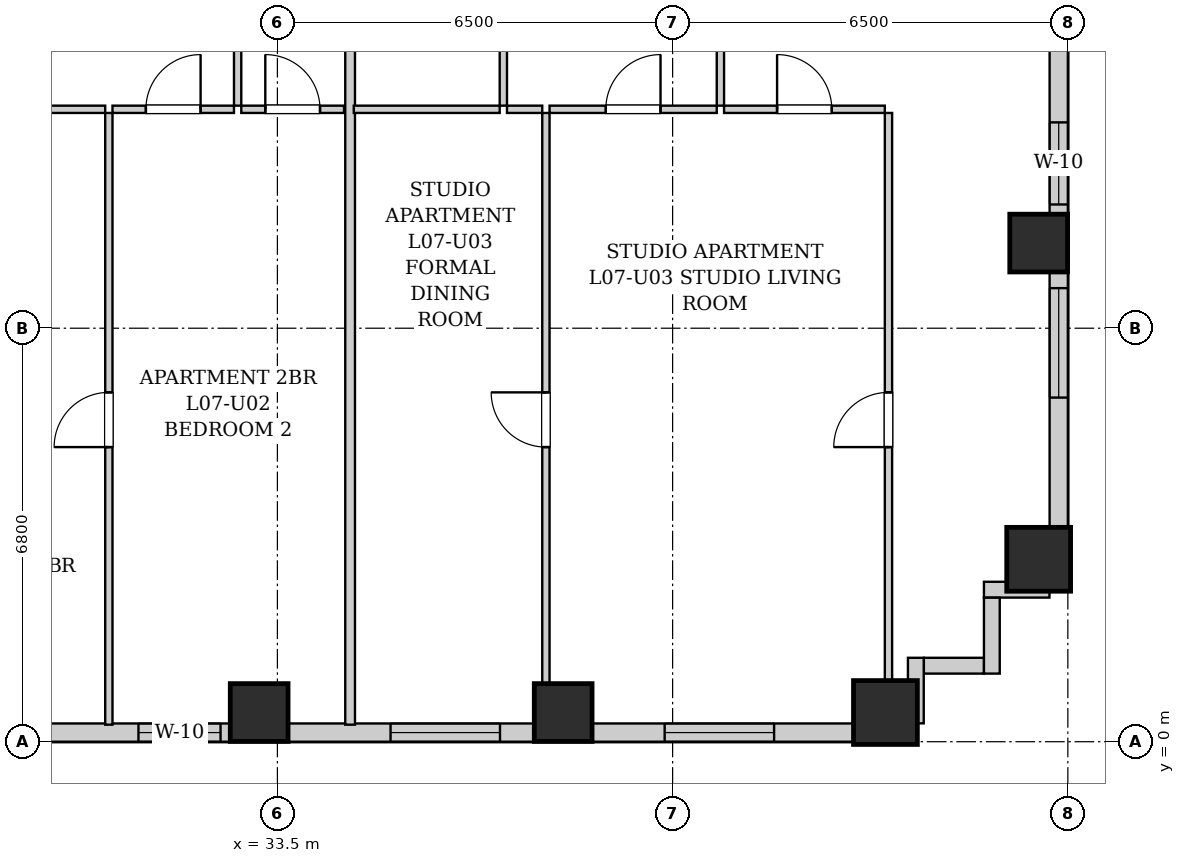
"""IFC4 building model, lengths in metres.
Left out: names, types, materials, properties, quantities, classifications, styles, units other than length and angle.
Written with IfcOpenShell. Run it as: python <this file> out.ifc"""

import sys

from ifc_helpers import new_model, si_unit, direction, frame, frame_2d, origin, origin_2d, place, context, subcontext, project, spatial, rectangle, extrude, element, fill, save


model = new_model("IFC4")
c1 = context("Model", 3, precision=1e-05, world=origin(), true_north=direction((0.0, 1.0)))
c2 = subcontext(c1, "Body", "Model", "MODEL_VIEW")
j1 = project(units=[si_unit("LENGTHUNIT", "METRE"), si_unit("PLANEANGLEUNIT", "RADIAN")], contexts=[c1])
p1 = place(None, origin())
s1 = spatial("IfcSite", under=j1, at=p1, CompositionType="ELEMENT")
p2 = place(p1, origin())
s2 = spatial("IfcBuilding", under=s1, at=p2, CompositionType="ELEMENT")
p3 = place(p2, frame((0.0, 0.0, 32.2)))
s3 = spatial("IfcBuildingStorey", under=s2, at=p3, CompositionType="ELEMENT", Elevation=32.2)
for number, where, z_axis, x_axis in (
    (1, (33.2, 0.48, 0.0), (0.0, 0.0, 1.0), (1.0, 0.0, 0.0)),
    (2, (38.2, 0.48, 0.0), (0.0, 0.0, 1.0), (1.0, 0.0, 0.0)),
):
    element("IfcColumn", number, at=place(p3, frame(where, z_axis=z_axis, x_axis=x_axis)), inside=s3, PredefinedType="COLUMN", context=c2, shape_type="SweptSolid", body=[
        extrude(rectangle(XDim=0.95, YDim=0.95, at=origin_2d()), origin(), (0.0, 0.0, 1.0), 3.2),
    ])
for number, where, z_axis, x_axis in (
    (3, (43.5, 0.48, 0.0), (0.0, 0.0, 1.0), (1.0, 0.0, 0.0)),
    (4, (46.02, 3.0, 0.0), (0.0, 0.0, 1.0), (1.0, 0.0, 0.0)),
):
    element("IfcColumn", number, at=place(p3, frame(where, z_axis=z_axis, x_axis=x_axis)), inside=s3, PredefinedType="COLUMN", context=c2, shape_type="SweptSolid", body=[
        extrude(rectangle(XDim=1.05, YDim=1.05, at=origin_2d()), origin(), (0.0, 0.0, 1.0), 3.2),
    ])
p4 = place(p3, frame((46.02, 8.2, 0.0), z_axis=(0.0, 0.0, 1.0), x_axis=(1.0, 0.0, 0.0)))
e5 = element("IfcColumn", 5, at=p4, inside=s3, PredefinedType="COLUMN", context=c2, shape_type="SweptSolid", body=[
    extrude(rectangle(XDim=0.95, YDim=0.95, at=origin_2d()), origin(), (0.0, 0.0, 1.0), 3.2),
])
p5 = place(p3, frame((46.35, 24.6, 0.0), z_axis=(0.0, 0.0, 1.0), x_axis=(0.0, -1.0, 0.0)))
e6 = element("IfcWall", 6, at=p5, inside=s3, PredefinedType="SOLIDWALL", context=c2, shape_type="SweptSolid", body=[
    extrude(rectangle(XDim=22.1, YDim=0.3, at=frame_2d((11.05, 0.0))), origin(), (0.0, 0.0, 1.0), 1.975),
])
p6 = place(p5, frame((17.141, 0.0, 0.55)))
e7 = element("IfcOpeningElement", 7, at=p6, cuts=e6, PredefinedType="OPENING", context=c2, shape_type="SweptSolid", body=[
    extrude(rectangle(XDim=1.8, YDim=1.2, at=frame_2d((0.9, 0.6))), frame((0.0, 0.16, 0.0), z_axis=(0.0, -1.0, 0.0), x_axis=(1.0, 0.0, 0.0)), (0.0, 0.0, 1.0), 0.32),
])
p7 = place(p5, frame((14.415, 0.0, 0.55)))
e8 = element("IfcOpeningElement", 8, at=p7, cuts=e6, PredefinedType="OPENING", context=c2, shape_type="SweptSolid", body=[
    extrude(rectangle(XDim=1.35, YDim=1.2, at=frame_2d((0.675, 0.6))), frame((0.0, 0.16, 0.0), z_axis=(0.0, -1.0, 0.0), x_axis=(1.0, 0.0, 0.0)), (0.0, 0.0, 1.0), 0.32),
])
p8 = place(p5, frame((5.1, 0.0, 0.55)))
e9 = element("IfcOpeningElement", 9, at=p8, cuts=e6, PredefinedType="OPENING", context=c2, shape_type="SweptSolid", body=[
    extrude(rectangle(XDim=1.8, YDim=1.2, at=frame_2d((0.9, 0.6))), frame((0.0, 0.16, 0.0), z_axis=(0.0, -1.0, 0.0), x_axis=(1.0, 0.0, 0.0)), (0.0, 0.0, 1.0), 0.32),
])
p9 = place(p5, frame((7.16, 0.0, 0.55)))
e10 = element("IfcOpeningElement", 10, at=p9, cuts=e6, PredefinedType="OPENING", context=c2, shape_type="SweptSolid", body=[
    extrude(rectangle(XDim=1.35, YDim=1.2, at=frame_2d((0.675, 0.6))), frame((0.0, 0.16, 0.0), z_axis=(0.0, -1.0, 0.0), x_axis=(1.0, 0.0, 0.0)), (0.0, 0.0, 1.0), 0.32),
])
p10 = place(p3, frame((44.0, 0.15, 0.0), z_axis=(0.0, 0.0, 1.0), x_axis=(-1.0, 0.0, 0.0)))
e11 = element("IfcWall", 11, at=p10, inside=s3, PredefinedType="SOLIDWALL", context=c2, shape_type="SweptSolid", body=[
    extrude(rectangle(XDim=26.9, YDim=0.3, at=frame_2d((13.45, 0.0))), origin(), (0.0, 0.0, 1.0), 1.975),
])
p11 = place(p10, frame((22.544, 0.0, 0.55)))
e12 = element("IfcOpeningElement", 12, at=p11, cuts=e11, PredefinedType="OPENING", context=c2, shape_type="SweptSolid", body=[
    extrude(rectangle(XDim=1.8, YDim=1.2, at=frame_2d((0.9, 0.6))), frame((0.0, 0.16, 0.0), z_axis=(0.0, -1.0, 0.0), x_axis=(1.0, 0.0, 0.0)), (0.0, 0.0, 1.0), 0.32),
])
p12 = place(p10, frame((14.353, 0.0, 0.55)))
e13 = element("IfcOpeningElement", 13, at=p12, cuts=e11, PredefinedType="OPENING", context=c2, shape_type="SweptSolid", body=[
    extrude(rectangle(XDim=1.8, YDim=1.2, at=frame_2d((0.9, 0.6))), frame((0.0, 0.16, 0.0), z_axis=(0.0, -1.0, 0.0), x_axis=(1.0, 0.0, 0.0)), (0.0, 0.0, 1.0), 0.32),
])
p13 = place(p10, frame((11.435, 0.0, 0.55)))
e14 = element("IfcOpeningElement", 14, at=p13, cuts=e11, PredefinedType="OPENING", context=c2, shape_type="SweptSolid", body=[
    extrude(rectangle(XDim=1.35, YDim=1.2, at=frame_2d((0.675, 0.6))), frame((0.0, 0.16, 0.0), z_axis=(0.0, -1.0, 0.0), x_axis=(1.0, 0.0, 0.0)), (0.0, 0.0, 1.0), 0.32),
])
p14 = place(p10, frame((6.839, 0.0, 0.55)))
e15 = element("IfcOpeningElement", 15, at=p14, cuts=e11, PredefinedType="OPENING", context=c2, shape_type="SweptSolid", body=[
    extrude(rectangle(XDim=1.8, YDim=1.2, at=frame_2d((0.9, 0.6))), frame((0.0, 0.16, 0.0), z_axis=(0.0, -1.0, 0.0), x_axis=(1.0, 0.0, 0.0)), (0.0, 0.0, 1.0), 0.32),
])
p15 = place(p10, frame((2.331, 0.0, 0.55)))
e16 = element("IfcOpeningElement", 16, at=p15, cuts=e11, PredefinedType="OPENING", context=c2, shape_type="SweptSolid", body=[
    extrude(rectangle(XDim=1.8, YDim=1.2, at=frame_2d((0.9, 0.6))), frame((0.0, 0.16, 0.0), z_axis=(0.0, -1.0, 0.0), x_axis=(1.0, 0.0, 0.0)), (0.0, 0.0, 1.0), 0.32),
])
p16 = place(p3, frame((46.198, 2.5, 0.0), z_axis=(0.0, 0.0, 1.0), x_axis=(-1.0, 0.0, 0.0)))
e17 = element("IfcWall", 17, at=p16, inside=s3, PredefinedType="SOLIDWALL", context=c2, shape_type="SweptSolid", body=[
    extrude(rectangle(XDim=1.078, YDim=0.26, at=frame_2d((0.539, 0.0))), origin(), (0.0, 0.0, 1.0), 2.94),
])
p17 = place(p3, frame((45.25, 2.368, 0.0), z_axis=(0.0, 0.0, 1.0), x_axis=(0.0, -1.0, 0.0)))
e18 = element("IfcWall", 18, at=p17, inside=s3, PredefinedType="SOLIDWALL", context=c2, shape_type="SweptSolid", body=[
    extrude(rectangle(XDim=1.248, YDim=0.26, at=frame_2d((0.624, 0.0))), origin(), (0.0, 0.0, 1.0), 2.94),
])
p18 = place(p3, frame((45.118, 1.25, 0.0), z_axis=(0.0, 0.0, 1.0), x_axis=(-1.0, 0.0, 0.0)))
e19 = element("IfcWall", 19, at=p18, inside=s3, PredefinedType="SOLIDWALL", context=c2, shape_type="SweptSolid", body=[
    extrude(rectangle(XDim=0.986, YDim=0.26, at=frame_2d((0.493, 0.0))), origin(), (0.0, 0.0, 1.0), 2.94),
])
p19 = place(p3, frame((44.0, 1.38, 0.0), z_axis=(0.0, 0.0, 1.0), x_axis=(0.0, -1.0, 0.0)))
e20 = element("IfcWall", 20, at=p19, inside=s3, PredefinedType="SOLIDWALL", context=c2, shape_type="SweptSolid", body=[
    extrude(rectangle(XDim=1.078, YDim=0.26, at=frame_2d((0.539, 0.0))), origin(), (0.0, 0.0, 1.0), 2.94),
])
p20 = place(p3, frame((32.846, 10.46, 0.0), z_axis=(0.0, 0.0, 1.0), x_axis=(0.0, 1.0, 0.0)))
e21 = element("IfcWall", 21, at=p20, inside=s3, PredefinedType="PARTITIONING", context=c2, shape_type="SweptSolid", body=[
    extrude(rectangle(XDim=2.85, YDim=0.12, at=frame_2d((1.425, 0.0))), origin(), (0.0, 0.0, 1.0), 2.94),
])
p21 = place(p20, frame((0.975, 0.0, 0.0)))
e22 = element("IfcOpeningElement", 22, at=p21, cuts=e21, PredefinedType="OPENING", context=c2, shape_type="SweptSolid", body=[
    extrude(rectangle(XDim=0.9, YDim=2.05, at=frame_2d((0.45, 1.025))), frame((0.0, 0.07, 0.0), z_axis=(0.0, -1.0, 0.0), x_axis=(1.0, 0.0, 0.0)), (0.0, 0.0, 1.0), 0.14),
])
p22 = place(p3, frame((29.636, 10.4, 0.0), z_axis=(0.0, 0.0, 1.0), x_axis=(1.0, 0.0, 0.0)))
e23 = element("IfcWall", 23, at=p22, inside=s3, PredefinedType="PARTITIONING", context=c2, shape_type="SweptSolid", body=[
    extrude(rectangle(XDim=1.032, YDim=0.12, at=frame_2d((0.516, 0.0))), origin(), (0.0, 0.0, 1.0), 2.94),
])
p23 = place(p3, frame((30.788, 10.4, 0.0), z_axis=(0.0, 0.0, 1.0), x_axis=(1.0, 0.0, 0.0)))
e24 = element("IfcWall", 24, at=p23, inside=s3, PredefinedType="PARTITIONING", context=c2, shape_type="SweptSolid", body=[
    extrude(rectangle(XDim=1.998, YDim=0.12, at=frame_2d((0.999, 0.0))), origin(), (0.0, 0.0, 1.0), 2.94),
])
p24 = place(p23, frame((0.549, 0.0, 0.0)))
e25 = element("IfcOpeningElement", 25, at=p24, cuts=e24, PredefinedType="OPENING", context=c2, shape_type="SweptSolid", body=[
    extrude(rectangle(XDim=0.9, YDim=2.05, at=frame_2d((0.45, 1.025))), frame((0.0, 0.07, 0.0), z_axis=(0.0, -1.0, 0.0), x_axis=(1.0, 0.0, 0.0)), (0.0, 0.0, 1.0), 0.14),
])
p25 = place(p3, frame((32.906, 10.4, 0.0), z_axis=(0.0, 0.0, 1.0), x_axis=(1.0, 0.0, 0.0)))
e26 = element("IfcWall", 26, at=p25, inside=s3, PredefinedType="PARTITIONING", context=c2, shape_type="SweptSolid", body=[
    extrude(rectangle(XDim=1.69, YDim=0.12, at=frame_2d((0.845, 0.0))), origin(), (0.0, 0.0, 1.0), 2.94),
])
p26 = place(p25, frame((0.395, 0.0, 0.0)))
e27 = element("IfcOpeningElement", 27, at=p26, cuts=e26, PredefinedType="OPENING", context=c2, shape_type="SweptSolid", body=[
    extrude(rectangle(XDim=0.9, YDim=2.05, at=frame_2d((0.45, 1.025))), frame((0.0, 0.07, 0.0), z_axis=(0.0, -1.0, 0.0), x_axis=(1.0, 0.0, 0.0)), (0.0, 0.0, 1.0), 0.14),
])
p27 = place(p3, frame((30.728, 0.28, 0.0), z_axis=(0.0, 0.0, 1.0), x_axis=(0.0, 1.0, 0.0)))
e28 = element("IfcWall", 28, at=p27, inside=s3, PredefinedType="PARTITIONING", context=c2, shape_type="SweptSolid", body=[
    extrude(rectangle(XDim=10.06, YDim=0.12, at=frame_2d((5.03, 0.0))), origin(), (0.0, 0.0, 1.0), 2.94),
])
p28 = place(p27, frame((4.565, 0.0, 0.0)))
e29 = element("IfcOpeningElement", 29, at=p28, cuts=e28, PredefinedType="OPENING", context=c2, shape_type="SweptSolid", body=[
    extrude(rectangle(XDim=0.9, YDim=2.05, at=frame_2d((0.45, 1.025))), frame((0.0, 0.07, 0.0), z_axis=(0.0, -1.0, 0.0), x_axis=(1.0, 0.0, 0.0)), (0.0, 0.0, 1.0), 0.14),
])
p29 = place(p3, frame((34.696, 0.28, 0.0), z_axis=(0.0, 0.0, 1.0), x_axis=(0.0, 1.0, 0.0)))
e30 = element("IfcWall", 30, at=p29, inside=s3, PredefinedType="PARTITIONING", context=c2, shape_type="SweptSolid", body=[
    extrude(rectangle(XDim=13.03, YDim=0.16, at=frame_2d((6.515, 0.0))), origin(), (0.0, 0.0, 1.0), 2.94),
])
p30 = place(p3, frame((37.216, 10.46, 0.0), z_axis=(0.0, 0.0, 1.0), x_axis=(0.0, 1.0, 0.0)))
e31 = element("IfcWall", 31, at=p30, inside=s3, PredefinedType="PARTITIONING", context=c2, shape_type="SweptSolid", body=[
    extrude(rectangle(XDim=2.85, YDim=0.12, at=frame_2d((1.425, 0.0))), origin(), (0.0, 0.0, 1.0), 2.94),
])
p31 = place(p30, frame((0.995, 0.0, 0.0)))
e32 = element("IfcOpeningElement", 32, at=p31, cuts=e31, PredefinedType="OPENING", context=c2, shape_type="SweptSolid", body=[
    extrude(rectangle(XDim=0.86, YDim=2.05, at=frame_2d((0.43, 1.025))), frame((0.0, 0.07, 0.0), z_axis=(0.0, -1.0, 0.0), x_axis=(1.0, 0.0, 0.0)), (0.0, 0.0, 1.0), 0.14),
])
p32 = place(p3, frame((34.756, 10.4, 0.0), z_axis=(0.0, 0.0, 1.0), x_axis=(1.0, 0.0, 0.0)))
e33 = element("IfcWall", 33, at=p32, inside=s3, PredefinedType="PARTITIONING", context=c2, shape_type="SweptSolid", body=[
    extrude(rectangle(XDim=2.4, YDim=0.12, at=frame_2d((1.2, 0.0))), origin(), (0.0, 0.0, 1.0), 2.94),
])
p33 = place(p3, frame((40.786, 10.46, 0.0), z_axis=(0.0, 0.0, 1.0), x_axis=(0.0, 1.0, 0.0)))
e34 = element("IfcWall", 34, at=p33, inside=s3, PredefinedType="PARTITIONING", context=c2, shape_type="SweptSolid", body=[
    extrude(rectangle(XDim=2.85, YDim=0.12, at=frame_2d((1.425, 0.0))), origin(), (0.0, 0.0, 1.0), 2.94),
])
p34 = place(p33, frame((0.975, 0.0, 0.0)))
e35 = element("IfcOpeningElement", 35, at=p34, cuts=e34, PredefinedType="OPENING", context=c2, shape_type="SweptSolid", body=[
    extrude(rectangle(XDim=0.9, YDim=2.05, at=frame_2d((0.45, 1.025))), frame((0.0, 0.07, 0.0), z_axis=(0.0, -1.0, 0.0), x_axis=(1.0, 0.0, 0.0)), (0.0, 0.0, 1.0), 0.14),
])
p35 = place(p3, frame((37.276, 10.4, 0.0), z_axis=(0.0, 0.0, 1.0), x_axis=(1.0, 0.0, 0.0)))
e36 = element("IfcWall", 36, at=p35, inside=s3, PredefinedType="PARTITIONING", context=c2, shape_type="SweptSolid", body=[
    extrude(rectangle(XDim=0.58, YDim=0.12, at=frame_2d((0.29, 0.0))), origin(), (0.0, 0.0, 1.0), 2.94),
])
p36 = place(p3, frame((37.976, 10.4, 0.0), z_axis=(0.0, 0.0, 1.0), x_axis=(1.0, 0.0, 0.0)))
e37 = element("IfcWall", 37, at=p36, inside=s3, PredefinedType="PARTITIONING", context=c2, shape_type="SweptSolid", body=[
    extrude(rectangle(XDim=2.75, YDim=0.12, at=frame_2d((1.375, 0.0))), origin(), (0.0, 0.0, 1.0), 2.94),
])
p37 = place(p36, frame((0.925, 0.0, 0.0)))
e38 = element("IfcOpeningElement", 38, at=p37, cuts=e37, PredefinedType="OPENING", context=c2, shape_type="SweptSolid", body=[
    extrude(rectangle(XDim=0.9, YDim=2.05, at=frame_2d((0.45, 1.025))), frame((0.0, 0.07, 0.0), z_axis=(0.0, -1.0, 0.0), x_axis=(1.0, 0.0, 0.0)), (0.0, 0.0, 1.0), 0.14),
])
p38 = place(p3, frame((40.846, 10.4, 0.0), z_axis=(0.0, 0.0, 1.0), x_axis=(1.0, 0.0, 0.0)))
e39 = element("IfcWall", 39, at=p38, inside=s3, PredefinedType="PARTITIONING", context=c2, shape_type="SweptSolid", body=[
    extrude(rectangle(XDim=2.644, YDim=0.12, at=frame_2d((1.322, 0.0))), origin(), (0.0, 0.0, 1.0), 2.94),
])
p39 = place(p38, frame((0.872, 0.0, 0.0)))
e40 = element("IfcOpeningElement", 40, at=p39, cuts=e39, PredefinedType="OPENING", context=c2, shape_type="SweptSolid", body=[
    extrude(rectangle(XDim=0.9, YDim=2.05, at=frame_2d((0.45, 1.025))), frame((0.0, 0.07, 0.0), z_axis=(0.0, -1.0, 0.0), x_axis=(1.0, 0.0, 0.0)), (0.0, 0.0, 1.0), 0.14),
])
p40 = place(p3, frame((37.916, 0.28, 0.0), z_axis=(0.0, 0.0, 1.0), x_axis=(0.0, 1.0, 0.0)))
e41 = element("IfcWall", 41, at=p40, inside=s3, PredefinedType="PARTITIONING", context=c2, shape_type="SweptSolid", body=[
    extrude(rectangle(XDim=10.06, YDim=0.12, at=frame_2d((5.03, 0.0))), origin(), (0.0, 0.0, 1.0), 2.94),
])
p41 = place(p40, frame((4.565, 0.0, 0.0)))
e42 = element("IfcOpeningElement", 42, at=p41, cuts=e41, PredefinedType="OPENING", context=c2, shape_type="SweptSolid", body=[
    extrude(rectangle(XDim=0.9, YDim=2.05, at=frame_2d((0.45, 1.025))), frame((0.0, 0.07, 0.0), z_axis=(0.0, -1.0, 0.0), x_axis=(1.0, 0.0, 0.0)), (0.0, 0.0, 1.0), 0.14),
])
p42 = place(p3, frame((43.55, 0.28, 0.0), z_axis=(0.0, 0.0, 1.0), x_axis=(0.0, 1.0, 0.0)))
e43 = element("IfcWall", 43, at=p42, inside=s3, PredefinedType="PARTITIONING", context=c2, shape_type="SweptSolid", body=[
    extrude(rectangle(XDim=10.06, YDim=0.12, at=frame_2d((5.03, 0.0))), origin(), (0.0, 0.0, 1.0), 2.94),
])
p43 = place(p42, frame((4.565, 0.0, 0.0)))
e44 = element("IfcOpeningElement", 44, at=p43, cuts=e43, PredefinedType="OPENING", context=c2, shape_type="SweptSolid", body=[
    extrude(rectangle(XDim=0.9, YDim=2.05, at=frame_2d((0.45, 1.025))), frame((0.0, 0.07, 0.0), z_axis=(0.0, -1.0, 0.0), x_axis=(1.0, 0.0, 0.0)), (0.0, 0.0, 1.0), 0.14),
])
p44 = place(p24, origin())
e45 = element("IfcDoor", 45, at=p44, inside=s3, OperationType="SINGLE_SWING_RIGHT", PredefinedType="DOOR", context=c2, shape_type="SweptSolid", body=[
    extrude(rectangle(XDim=0.9, YDim=2.05, at=frame_2d((0.45, 1.025))), frame((0.0, 0.025, 0.0), z_axis=(0.0, -1.0, 0.0), x_axis=(1.0, 0.0, 0.0)), (0.0, 0.0, 1.0), 0.05),
])
fill(e25, e45)
p45 = place(p26, origin())
e46 = element("IfcDoor", 46, at=p45, inside=s3, OperationType="SINGLE_SWING_LEFT", PredefinedType="DOOR", context=c2, shape_type="SweptSolid", body=[
    extrude(rectangle(XDim=0.9, YDim=2.05, at=frame_2d((0.45, 1.025))), frame((0.0, 0.025, 0.0), z_axis=(0.0, -1.0, 0.0), x_axis=(1.0, 0.0, 0.0)), (0.0, 0.0, 1.0), 0.05),
])
fill(e27, e46)
p46 = place(p28, origin())
e47 = element("IfcDoor", 47, at=p46, inside=s3, OperationType="SINGLE_SWING_LEFT", PredefinedType="DOOR", context=c2, shape_type="SweptSolid", body=[
    extrude(rectangle(XDim=0.9, YDim=2.05, at=frame_2d((0.45, 1.025))), frame((0.0, 0.025, 0.0), z_axis=(0.0, -1.0, 0.0), x_axis=(1.0, 0.0, 0.0)), (0.0, 0.0, 1.0), 0.05),
])
fill(e29, e47)
p47 = place(p37, origin())
e48 = element("IfcDoor", 48, at=p47, inside=s3, OperationType="SINGLE_SWING_RIGHT", PredefinedType="DOOR", context=c2, shape_type="SweptSolid", body=[
    extrude(rectangle(XDim=0.9, YDim=2.05, at=frame_2d((0.45, 1.025))), frame((0.0, 0.025, 0.0), z_axis=(0.0, -1.0, 0.0), x_axis=(1.0, 0.0, 0.0)), (0.0, 0.0, 1.0), 0.05),
])
fill(e38, e48)
p48 = place(p39, origin())
e49 = element("IfcDoor", 49, at=p48, inside=s3, OperationType="SINGLE_SWING_LEFT", PredefinedType="DOOR", context=c2, shape_type="SweptSolid", body=[
    extrude(rectangle(XDim=0.9, YDim=2.05, at=frame_2d((0.45, 1.025))), frame((0.0, 0.025, 0.0), z_axis=(0.0, -1.0, 0.0), x_axis=(1.0, 0.0, 0.0)), (0.0, 0.0, 1.0), 0.05),
])
fill(e40, e49)
p49 = place(p41, origin())
e50 = element("IfcDoor", 50, at=p49, inside=s3, OperationType="SINGLE_SWING_RIGHT", PredefinedType="DOOR", context=c2, shape_type="SweptSolid", body=[
    extrude(rectangle(XDim=0.9, YDim=2.05, at=frame_2d((0.45, 1.025))), frame((0.0, 0.025, 0.0), z_axis=(0.0, -1.0, 0.0), x_axis=(1.0, 0.0, 0.0)), (0.0, 0.0, 1.0), 0.05),
])
fill(e42, e50)
p50 = place(p43, origin())
e51 = element("IfcDoor", 51, at=p50, inside=s3, OperationType="SINGLE_SWING_LEFT", PredefinedType="DOOR", context=c2, shape_type="SweptSolid", body=[
    extrude(rectangle(XDim=0.9, YDim=2.05, at=frame_2d((0.45, 1.025))), frame((0.0, 0.025, 0.0), z_axis=(0.0, -1.0, 0.0), x_axis=(1.0, 0.0, 0.0)), (0.0, 0.0, 1.0), 0.05),
])
fill(e44, e51)
p51 = place(p13, origin())
e52 = element("IfcWindow", 52, at=p51, inside=s3, PartitioningType="SINGLE_PANEL", PredefinedType="WINDOW", context=c2, shape_type="SweptSolid", body=[
    extrude(rectangle(XDim=1.35, YDim=1.2, at=frame_2d((0.675, 0.6))), frame((0.0, 0.03, 0.0), z_axis=(0.0, -1.0, 0.0), x_axis=(1.0, 0.0, 0.0)), (0.0, 0.0, 1.0), 0.06),
])
fill(e14, e52)
p52 = place(p14, origin())
e53 = element("IfcWindow", 53, at=p52, inside=s3, PartitioningType="DOUBLE_PANEL_VERTICAL", PredefinedType="WINDOW", context=c2, shape_type="SweptSolid", body=[
    extrude(rectangle(XDim=1.8, YDim=1.2, at=frame_2d((0.9, 0.6))), frame((0.0, 0.03, 0.0), z_axis=(0.0, -1.0, 0.0), x_axis=(1.0, 0.0, 0.0)), (0.0, 0.0, 1.0), 0.06),
])
fill(e15, e53)
p53 = place(p15, origin())
e54 = element("IfcWindow", 54, at=p53, inside=s3, PartitioningType="DOUBLE_PANEL_VERTICAL", PredefinedType="WINDOW", context=c2, shape_type="SweptSolid", body=[
    extrude(rectangle(XDim=1.8, YDim=1.2, at=frame_2d((0.9, 0.6))), frame((0.0, 0.03, 0.0), z_axis=(0.0, -1.0, 0.0), x_axis=(1.0, 0.0, 0.0)), (0.0, 0.0, 1.0), 0.06),
])
fill(e16, e54)
p54 = place(p6, origin())
e55 = element("IfcWindow", 55, at=p54, inside=s3, PartitioningType="DOUBLE_PANEL_VERTICAL", PredefinedType="WINDOW", context=c2, shape_type="SweptSolid", body=[
    extrude(rectangle(XDim=1.8, YDim=1.2, at=frame_2d((0.9, 0.6))), frame((0.0, 0.03, 0.0), z_axis=(0.0, -1.0, 0.0), x_axis=(1.0, 0.0, 0.0)), (0.0, 0.0, 1.0), 0.06),
])
fill(e7, e55)
p55 = place(p7, origin())
e56 = element("IfcWindow", 56, at=p55, inside=s3, PartitioningType="SINGLE_PANEL", PredefinedType="WINDOW", context=c2, shape_type="SweptSolid", body=[
    extrude(rectangle(XDim=1.35, YDim=1.2, at=frame_2d((0.675, 0.6))), frame((0.0, 0.03, 0.0), z_axis=(0.0, -1.0, 0.0), x_axis=(1.0, 0.0, 0.0)), (0.0, 0.0, 1.0), 0.06),
])
fill(e8, e56)
save(model, sys.argv[1])
